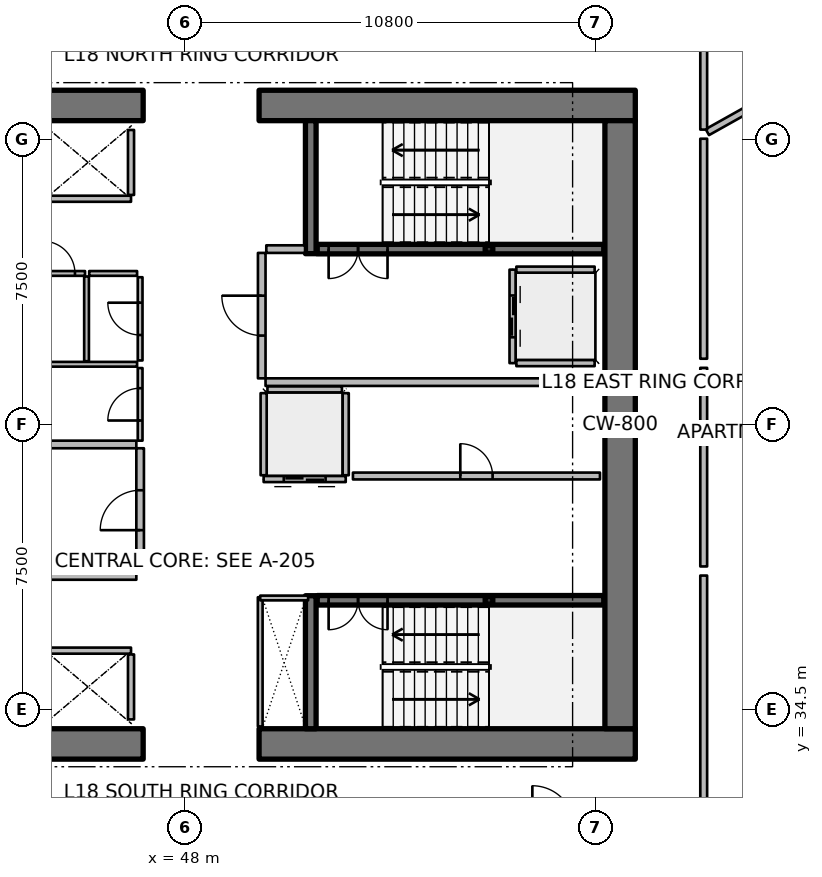
"""IFC4 building model, lengths in metres.
Left out: names, types, materials, properties, quantities, classifications, styles, units other than length and angle.
Written with IfcOpenShell. Run it as: python <this file> out.ifc"""

import sys

from ifc_helpers import new_model, si_unit, direction, frame, frame_2d, origin, origin_2d, place, context, subcontext, project, spatial, rectangle, hollow_rectangle, extrude, element, fill, save


model = new_model("IFC4")
c1 = context("Model", 3, precision=1e-05, world=origin(), true_north=direction((0.0, 1.0)))
c2 = subcontext(c1, "Body", "Model", "MODEL_VIEW")
j1 = project(units=[si_unit("LENGTHUNIT", "METRE"), si_unit("PLANEANGLEUNIT", "RADIAN")], contexts=[c1])
p1 = place(None, origin())
s1 = spatial("IfcSite", under=j1, at=p1, CompositionType="ELEMENT")
p2 = place(p1, origin())
s2 = spatial("IfcBuilding", under=s1, at=p2, CompositionType="ELEMENT")
p3 = place(p2, frame((0.0, 0.0, 75.15)))
s3 = spatial("IfcBuildingStorey", under=s2, at=p3, CompositionType="ELEMENT", Elevation=75.15)
p4 = place(p3, frame((37.0, 33.6, 0.0), z_axis=(0.0, 0.0, 1.0), x_axis=(1.0, 0.0, 0.0)))
e1 = element("IfcWall", 1, at=p4, inside=s3, PredefinedType="SHEAR", context=c2, shape_type="SweptSolid", body=[
    extrude(rectangle(XDim=9.9, YDim=0.8, at=frame_2d((4.95, 0.0))), origin(), (0.0, 0.0, 1.0), 3.75),
])
p5 = place(p3, frame((49.95, 33.6, 0.0), z_axis=(0.0, 0.0, 1.0), x_axis=(1.0, 0.0, 0.0)))
e2 = element("IfcWall", 2, at=p5, inside=s3, PredefinedType="SHEAR", context=c2, shape_type="SweptSolid", body=[
    extrude(rectangle(XDim=9.9, YDim=0.8, at=frame_2d((4.95, 0.0))), origin(), (0.0, 0.0, 1.0), 3.75),
])
p6 = place(p3, frame((37.0, 50.4, 0.0), z_axis=(0.0, 0.0, 1.0), x_axis=(1.0, 0.0, 0.0)))
e3 = element("IfcWall", 3, at=p6, inside=s3, PredefinedType="SHEAR", context=c2, shape_type="SweptSolid", body=[
    extrude(rectangle(XDim=9.9, YDim=0.8, at=frame_2d((4.95, 0.0))), origin(), (0.0, 0.0, 1.0), 3.75),
])
p7 = place(p3, frame((49.95, 50.4, 0.0), z_axis=(0.0, 0.0, 1.0), x_axis=(1.0, 0.0, 0.0)))
e4 = element("IfcWall", 4, at=p7, inside=s3, PredefinedType="SHEAR", context=c2, shape_type="SweptSolid", body=[
    extrude(rectangle(XDim=9.9, YDim=0.8, at=frame_2d((4.95, 0.0))), origin(), (0.0, 0.0, 1.0), 3.75),
])
p8 = place(p3, frame((59.45, 34.0, 0.0), z_axis=(0.0, 0.0, 1.0), x_axis=(0.0, 1.0, 0.0)))
e5 = element("IfcWall", 5, at=p8, inside=s3, PredefinedType="SHEAR", context=c2, shape_type="SweptSolid", body=[
    extrude(rectangle(XDim=16.0, YDim=0.8, at=frame_2d((8.0, 0.0))), origin(), (0.0, 0.0, 1.0), 3.75),
])
for number, where, z_axis, x_axis in (
    (6, (51.31, 46.5, 0.0), (0.0, 0.0, 1.0), (0.0, 1.0, 0.0)),
    (7, (51.31, 34.0, 0.0), (0.0, 0.0, 1.0), (0.0, 1.0, 0.0)),
):
    element("IfcWall", number, at=place(p3, frame(where, z_axis=z_axis, x_axis=x_axis)), inside=s3, PredefinedType="SHEAR", context=c2, shape_type="SweptSolid", body=[
        extrude(rectangle(XDim=3.5, YDim=0.28, at=frame_2d((1.75, 0.0))), origin(), (0.0, 0.0, 1.0), 3.75),
    ])
for number, where, z_axis, x_axis in (
    (8, (56.0, 46.62, 0.0), (0.0, 0.0, 1.0), (1.0, 0.0, 0.0)),
    (9, (56.0, 37.38, 0.0), (0.0, 0.0, 1.0), (1.0, 0.0, 0.0)),
):
    element("IfcColumn", number, at=place(p3, frame(where, z_axis=z_axis, x_axis=x_axis)), inside=s3, PredefinedType="COLUMN", context=c2, shape_type="SweptSolid", body=[
        extrude(hollow_rectangle(XDim=0.2, YDim=0.2, WallThickness=0.01, InnerFilletRadius=0.01, OuterFilletRadius=0.02, at=origin_2d()), origin(), (0.0, 0.0, 1.0), 1.67),
    ])
p9 = place(p3, frame((51.48, 46.62, 0.0), z_axis=(0.0, 0.0, 1.0), x_axis=(1.0, 0.0, 0.0)))
e10 = element("IfcWall", 10, at=p9, inside=s3, PredefinedType="SOLIDWALL", context=c2, shape_type="SweptSolid", body=[
    extrude(rectangle(XDim=7.54, YDim=0.25, at=frame_2d((3.77, 0.0))), origin(), (0.0, 0.0, 1.0), 3.5),
])
p10 = place(p9, frame((0.3, 0.0, 0.0)))
e11 = element("IfcOpeningElement", 11, at=p10, cuts=e10, PredefinedType="OPENING", context=c2, shape_type="SweptSolid", body=[
    extrude(rectangle(XDim=1.55, YDim=2.15, at=frame_2d((0.775, 1.075))), frame((0.0, 0.135, 0.0), z_axis=(0.0, -1.0, 0.0), x_axis=(1.0, 0.0, 0.0)), (0.0, 0.0, 1.0), 0.27),
])
p11 = place(p3, frame((51.48, 37.38, 0.0), z_axis=(0.0, 0.0, 1.0), x_axis=(1.0, 0.0, 0.0)))
e12 = element("IfcWall", 12, at=p11, inside=s3, PredefinedType="SOLIDWALL", context=c2, shape_type="SweptSolid", body=[
    extrude(rectangle(XDim=7.54, YDim=0.25, at=frame_2d((3.77, 0.0))), origin(), (0.0, 0.0, 1.0), 3.5),
])
p12 = place(p11, frame((0.3, 0.0, 0.0)))
e13 = element("IfcOpeningElement", 13, at=p12, cuts=e12, PredefinedType="OPENING", context=c2, shape_type="SweptSolid", body=[
    extrude(rectangle(XDim=1.55, YDim=2.15, at=frame_2d((0.775, 1.075))), frame((0.0, 0.135, 0.0), z_axis=(0.0, -1.0, 0.0), x_axis=(1.0, 0.0, 0.0)), (0.0, 0.0, 1.0), 0.27),
])
p13 = place(p3, frame((46.58, 47.945, 0.0), z_axis=(0.0, 0.0, 1.0), x_axis=(-1.0, 0.0, 0.0)))
e14 = element("IfcWall", 14, at=p13, inside=s3, PredefinedType="PARTITIONING", context=c2, shape_type="SweptSolid", body=[
    extrude(rectangle(XDim=2.26, YDim=0.16, at=frame_2d((1.13, 0.0))), origin(), (0.0, 0.0, 1.0), 3.5),
])
p14 = place(p3, frame((46.58, 48.045, 0.0), z_axis=(0.0, 0.0, 1.0), x_axis=(0.0, 1.0, 0.0)))
e15 = element("IfcWall", 15, at=p14, inside=s3, PredefinedType="PARTITIONING", context=c2, shape_type="SweptSolid", body=[
    extrude(rectangle(XDim=1.71, YDim=0.16, at=frame_2d((0.855, 0.0))), origin(), (0.0, 0.0, 1.0), 3.5),
])
p15 = place(p3, frame((44.32, 36.055, 0.0), z_axis=(0.0, 0.0, 1.0), x_axis=(1.0, 0.0, 0.0)))
e16 = element("IfcWall", 16, at=p15, inside=s3, PredefinedType="PARTITIONING", context=c2, shape_type="SweptSolid", body=[
    extrude(rectangle(XDim=2.26, YDim=0.16, at=frame_2d((1.13, 0.0))), origin(), (0.0, 0.0, 1.0), 3.5),
])
p16 = place(p3, frame((46.58, 34.245, 0.0), z_axis=(0.0, 0.0, 1.0), x_axis=(0.0, 1.0, 0.0)))
e17 = element("IfcWall", 17, at=p16, inside=s3, PredefinedType="PARTITIONING", context=c2, shape_type="SweptSolid", body=[
    extrude(rectangle(XDim=1.71, YDim=0.16, at=frame_2d((0.855, 0.0))), origin(), (0.0, 0.0, 1.0), 3.5),
])
p17 = place(p3, frame((56.62, 46.08, 0.0), z_axis=(0.0, 0.0, 1.0), x_axis=(0.0, -1.0, 0.0)))
e18 = element("IfcWall", 18, at=p17, inside=s3, PredefinedType="PARTITIONING", context=c2, shape_type="SweptSolid", body=[
    extrude(rectangle(XDim=2.46, YDim=0.16, at=frame_2d((1.23, 0.0))), origin(), (0.0, 0.0, 1.0), 3.5),
])
p18 = place(p17, frame((0.68, 0.0, 0.0)))
e19 = element("IfcOpeningElement", 19, at=p18, cuts=e18, PredefinedType="OPENING", context=c2, shape_type="SweptSolid", body=[
    extrude(rectangle(XDim=1.1, YDim=2.1, at=frame_2d((0.55, 1.05))), frame((0.0, 0.09, 0.0), z_axis=(0.0, -1.0, 0.0), x_axis=(1.0, 0.0, 0.0)), (0.0, 0.0, 1.0), 0.18),
])
for number, where, z_axis, x_axis in (
    (20, (56.72, 46.08, 0.0), (0.0, 0.0, 1.0), (1.0, 0.0, 0.0)),
    (21, (56.72, 43.62, 0.0), (0.0, 0.0, 1.0), (1.0, 0.0, 0.0)),
):
    element("IfcWall", number, at=place(p3, frame(where, z_axis=z_axis, x_axis=x_axis)), inside=s3, PredefinedType="PARTITIONING", context=c2, shape_type="SweptSolid", body=[
        extrude(rectangle(XDim=2.06, YDim=0.16, at=frame_2d((1.03, 0.0))), origin(), (0.0, 0.0, 1.0), 3.5),
    ])
p19 = place(p3, frame((52.23, 40.57, 0.0), z_axis=(0.0, 0.0, 1.0), x_axis=(-1.0, 0.0, 0.0)))
e22 = element("IfcWall", 22, at=p19, inside=s3, PredefinedType="PARTITIONING", context=c2, shape_type="SweptSolid", body=[
    extrude(rectangle(XDim=2.16, YDim=0.16, at=frame_2d((1.08, 0.0))), origin(), (0.0, 0.0, 1.0), 3.5),
])
p20 = place(p19, frame((0.53, 0.0, 0.0)))
e23 = element("IfcOpeningElement", 23, at=p20, cuts=e22, PredefinedType="OPENING", context=c2, shape_type="SweptSolid", body=[
    extrude(rectangle(XDim=1.1, YDim=2.1, at=frame_2d((0.55, 1.05))), frame((0.0, 0.09, 0.0), z_axis=(0.0, -1.0, 0.0), x_axis=(1.0, 0.0, 0.0)), (0.0, 0.0, 1.0), 0.18),
])
for number, where, z_axis, x_axis in (
    (24, (52.23, 40.67, 0.0), (0.0, 0.0, 1.0), (0.0, 1.0, 0.0)),
    (25, (50.07, 40.67, 0.0), (0.0, 0.0, 1.0), (0.0, 1.0, 0.0)),
):
    element("IfcWall", number, at=place(p3, frame(where, z_axis=z_axis, x_axis=x_axis)), inside=s3, PredefinedType="PARTITIONING", context=c2, shape_type="SweptSolid", body=[
        extrude(rectangle(XDim=2.16, YDim=0.16, at=frame_2d((1.08, 0.0))), origin(), (0.0, 0.0, 1.0), 3.5),
    ])
p21 = place(p3, frame((50.17, 42.93, 0.0), z_axis=(0.0, 0.0, 1.0), x_axis=(1.0, 0.0, 0.0)))
e26 = element("IfcWall", 26, at=p21, inside=s3, PredefinedType="PARTITIONING", context=c2, shape_type="SweptSolid", body=[
    extrude(rectangle(XDim=1.96, YDim=0.16, at=frame_2d((0.98, 0.0))), origin(), (0.0, 0.0, 1.0), 3.5),
])
p22 = place(p3, frame((52.42, 40.65, 0.0), z_axis=(0.0, 0.0, 1.0), x_axis=(1.0, 0.0, 0.0)))
e27 = element("IfcWall", 27, at=p22, inside=s3, PredefinedType="PARTITIONING", context=c2, shape_type="SweptSolid", body=[
    extrude(rectangle(XDim=6.5, YDim=0.18, at=frame_2d((3.25, 0.0))), origin(), (0.0, 0.0, 1.0), 3.5),
])
p23 = place(p22, frame((2.825, 0.0, 0.0)))
e28 = element("IfcOpeningElement", 28, at=p23, cuts=e27, PredefinedType="OPENING", context=c2, shape_type="SweptSolid", body=[
    extrude(rectangle(XDim=0.85, YDim=2.06, at=frame_2d((0.425, 1.03))), frame((0.0, 0.1, 0.0), z_axis=(0.0, -1.0, 0.0), x_axis=(1.0, 0.0, 0.0)), (0.0, 0.0, 1.0), 0.2),
])
p24 = place(p3, frame((41.35, 38.02, 0.0), z_axis=(0.0, 0.0, 1.0), x_axis=(1.0, 0.0, 0.0)))
e29 = element("IfcWall", 29, at=p24, inside=s3, PredefinedType="PARTITIONING", context=c2, shape_type="SweptSolid", body=[
    extrude(rectangle(XDim=5.37, YDim=0.2, at=frame_2d((2.685, 0.0))), origin(), (0.0, 0.0, 1.0), 3.5),
])
p25 = place(p3, frame((43.92, 41.48, 0.0), z_axis=(0.0, 0.0, 1.0), x_axis=(1.0, 0.0, 0.0)))
e30 = element("IfcWall", 30, at=p25, inside=s3, PredefinedType="PARTITIONING", context=c2, shape_type="SweptSolid", body=[
    extrude(rectangle(XDim=2.8, YDim=0.2, at=frame_2d((1.4, 0.0))), origin(), (0.0, 0.0, 1.0), 3.5),
])
p26 = place(p3, frame((46.82, 38.12, 0.0), z_axis=(0.0, 0.0, 1.0), x_axis=(0.0, 1.0, 0.0)))
e31 = element("IfcWall", 31, at=p26, inside=s3, PredefinedType="PARTITIONING", context=c2, shape_type="SweptSolid", body=[
    extrude(rectangle(XDim=3.26, YDim=0.2, at=frame_2d((1.63, 0.0))), origin(), (0.0, 0.0, 1.0), 3.5),
])
p27 = place(p26, frame((1.105, 0.0, 0.0)))
e32 = element("IfcOpeningElement", 32, at=p27, cuts=e31, PredefinedType="OPENING", context=c2, shape_type="SweptSolid", body=[
    extrude(rectangle(XDim=1.05, YDim=2.1, at=frame_2d((0.525, 1.05))), frame((0.0, 0.11, 0.0), z_axis=(0.0, -1.0, 0.0), x_axis=(1.0, 0.0, 0.0)), (0.0, 0.0, 1.0), 0.22),
])
p28 = place(p3, frame((50.12, 43.12, 0.0), z_axis=(0.0, 0.0, 1.0), x_axis=(1.0, 0.0, 0.0)))
e33 = element("IfcWall", 33, at=p28, inside=s3, PredefinedType="PARTITIONING", context=c2, shape_type="SweptSolid", body=[
    extrude(rectangle(XDim=8.88, YDim=0.2, at=frame_2d((4.44, 0.0))), origin(), (0.0, 0.0, 1.0), 3.5),
])
p29 = place(p3, frame((50.14, 46.62, 0.0), z_axis=(0.0, 0.0, 1.0), x_axis=(1.0, 0.0, 0.0)))
e34 = element("IfcWall", 34, at=p29, inside=s3, PredefinedType="PARTITIONING", context=c2, shape_type="SweptSolid", body=[
    extrude(rectangle(XDim=1.02, YDim=0.2, at=frame_2d((0.51, 0.0))), origin(), (0.0, 0.0, 1.0), 3.5),
])
p30 = place(p3, frame((50.02, 43.22, 0.0), z_axis=(0.0, 0.0, 1.0), x_axis=(0.0, 1.0, 0.0)))
e35 = element("IfcWall", 35, at=p30, inside=s3, PredefinedType="PARTITIONING", context=c2, shape_type="SweptSolid", body=[
    extrude(rectangle(XDim=3.3, YDim=0.2, at=frame_2d((1.65, 0.0))), origin(), (0.0, 0.0, 1.0), 3.5),
])
p31 = place(p30, frame((1.125, 0.0, 0.0)))
e36 = element("IfcOpeningElement", 36, at=p31, cuts=e35, PredefinedType="OPENING", context=c2, shape_type="SweptSolid", body=[
    extrude(rectangle(XDim=1.05, YDim=2.1, at=frame_2d((0.525, 1.05))), frame((0.0, 0.11, 0.0), z_axis=(0.0, -1.0, 0.0), x_axis=(1.0, 0.0, 0.0)), (0.0, 0.0, 1.0), 0.22),
])
p32 = place(p3, frame((49.98, 34.06, 0.0), z_axis=(0.0, 0.0, 1.0), x_axis=(0.0, 1.0, 0.0)))
e37 = element("IfcWall", 37, at=p32, inside=s3, PredefinedType="PARTITIONING", context=c2, shape_type="SweptSolid", body=[
    extrude(rectangle(XDim=3.4, YDim=0.125, at=frame_2d((1.7, 0.0))), origin(), (0.0, 0.0, 1.0), 2.94),
])
p33 = place(p3, frame((49.98, 37.44, 0.0), z_axis=(0.0, 0.0, 1.0), x_axis=(1.0, 0.0, 0.0)))
e38 = element("IfcWall", 38, at=p33, inside=s3, PredefinedType="PARTITIONING", context=c2, shape_type="SweptSolid", body=[
    extrude(rectangle(XDim=1.26, YDim=0.125, at=frame_2d((0.63, 0.0))), origin(), (0.0, 0.0, 1.0), 2.94),
])
p34 = place(p3, frame((44.03, 43.59, 0.0), z_axis=(0.0, 0.0, 1.0), x_axis=(1.0, 0.0, 0.0)))
e39 = element("IfcWall", 39, at=p34, inside=s3, PredefinedType="PARTITIONING", context=c2, shape_type="SweptSolid", body=[
    extrude(rectangle(XDim=2.71, YDim=0.125, at=frame_2d((1.355, 0.0))), origin(), (0.0, 0.0, 1.0), 2.94),
])
p35 = place(p3, frame((45.41, 43.67, 0.0), z_axis=(0.0, 0.0, 1.0), x_axis=(0.0, 1.0, 0.0)))
e40 = element("IfcWall", 40, at=p35, inside=s3, PredefinedType="PARTITIONING", context=c2, shape_type="SweptSolid", body=[
    extrude(rectangle(XDim=2.23, YDim=0.125, at=frame_2d((1.115, 0.0))), origin(), (0.0, 0.0, 1.0), 2.94),
])
p36 = place(p3, frame((46.82, 41.58, 0.0), z_axis=(0.0, 0.0, 1.0), x_axis=(0.0, 1.0, 0.0)))
e41 = element("IfcWall", 41, at=p36, inside=s3, PredefinedType="PARTITIONING", context=c2, shape_type="SweptSolid", body=[
    extrude(rectangle(XDim=1.91, YDim=0.125, at=frame_2d((0.955, 0.0))), origin(), (0.0, 0.0, 1.0), 2.94),
])
p37 = place(p36, frame((0.53, 0.0, 0.0)))
e42 = element("IfcOpeningElement", 42, at=p37, cuts=e41, PredefinedType="OPENING", context=c2, shape_type="SweptSolid", body=[
    extrude(rectangle(XDim=0.85, YDim=2.06, at=frame_2d((0.425, 1.03))), frame((0.0, 0.073, 0.0), z_axis=(0.0, -1.0, 0.0), x_axis=(1.0, 0.0, 0.0)), (0.0, 0.0, 1.0), 0.145),
])
p38 = place(p3, frame((46.82, 43.69, 0.0), z_axis=(0.0, 0.0, 1.0), x_axis=(0.0, 1.0, 0.0)))
e43 = element("IfcWall", 43, at=p38, inside=s3, PredefinedType="PARTITIONING", context=c2, shape_type="SweptSolid", body=[
    extrude(rectangle(XDim=2.19, YDim=0.125, at=frame_2d((1.095, 0.0))), origin(), (0.0, 0.0, 1.0), 2.94),
])
p39 = place(p38, frame((0.67, 0.0, 0.0)))
e44 = element("IfcOpeningElement", 44, at=p39, cuts=e43, PredefinedType="OPENING", context=c2, shape_type="SweptSolid", body=[
    extrude(rectangle(XDim=0.85, YDim=2.06, at=frame_2d((0.425, 1.03))), frame((0.0, 0.073, 0.0), z_axis=(0.0, -1.0, 0.0), x_axis=(1.0, 0.0, 0.0)), (0.0, 0.0, 1.0), 0.145),
])
p40 = place(p3, frame((43.99, 45.98, 0.0), z_axis=(0.0, 0.0, 1.0), x_axis=(1.0, 0.0, 0.0)))
e45 = element("IfcWall", 45, at=p40, inside=s3, PredefinedType="PARTITIONING", context=c2, shape_type="SweptSolid", body=[
    extrude(rectangle(XDim=1.38, YDim=0.125, at=frame_2d((0.69, 0.0))), origin(), (0.0, 0.0, 1.0), 2.94),
])
p41 = place(p40, frame((0.265, 0.0, 0.0)))
e46 = element("IfcOpeningElement", 46, at=p41, cuts=e45, PredefinedType="OPENING", context=c2, shape_type="SweptSolid", body=[
    extrude(rectangle(XDim=0.85, YDim=2.06, at=frame_2d((0.425, 1.03))), frame((0.0, 0.073, 0.0), z_axis=(0.0, -1.0, 0.0), x_axis=(1.0, 0.0, 0.0)), (0.0, 0.0, 1.0), 0.145),
])
p42 = place(p3, frame((45.48, 45.98, 0.0), z_axis=(0.0, 0.0, 1.0), x_axis=(1.0, 0.0, 0.0)))
e47 = element("IfcWall", 47, at=p42, inside=s3, PredefinedType="PARTITIONING", context=c2, shape_type="SweptSolid", body=[
    extrude(rectangle(XDim=1.26, YDim=0.125, at=frame_2d((0.63, 0.0))), origin(), (0.0, 0.0, 1.0), 2.94),
])
p43 = place(p3, frame((61.746, 49.698, 0.0), z_axis=(0.0, 0.0, 1.0), x_axis=(0.872489938668, 0.488632077256, 0.0)))
e48 = element("IfcWall", 48, at=p43, inside=s3, PredefinedType="PARTITIONING", context=c2, shape_type="SweptSolid", body=[
    extrude(rectangle(XDim=13.725, YDim=0.18, at=frame_2d((6.862, 0.0))), origin(), (0.0, 0.0, 1.0), 2.94),
])
p44 = place(p3, frame((61.65, 49.764, 0.0), z_axis=(0.0, 0.0, 1.0), x_axis=(0.0, 1.0, 0.0)))
e49 = element("IfcWall", 49, at=p44, inside=s3, PredefinedType="PARTITIONING", context=c2, shape_type="SweptSolid", body=[
    extrude(rectangle(XDim=2.716, YDim=0.18, at=frame_2d((1.358, 0.0))), origin(), (0.0, 0.0, 1.0), 2.94),
])
p45 = place(p3, frame((61.65, 31.52, 0.0), z_axis=(0.0, 0.0, 1.0), x_axis=(0.0, 1.0, 0.0)))
e50 = element("IfcWall", 50, at=p45, inside=s3, PredefinedType="PARTITIONING", context=c2, shape_type="SweptSolid", body=[
    extrude(rectangle(XDim=6.51, YDim=0.18, at=frame_2d((3.255, 0.0))), origin(), (0.0, 0.0, 1.0), 2.94),
])
p46 = place(p3, frame((61.65, 38.27, 0.0), z_axis=(0.0, 0.0, 1.0), x_axis=(0.0, 1.0, 0.0)))
e51 = element("IfcWall", 51, at=p46, inside=s3, PredefinedType="PARTITIONING", context=c2, shape_type="SweptSolid", body=[
    extrude(rectangle(XDim=5.225, YDim=0.18, at=frame_2d((2.613, 0.0))), origin(), (0.0, 0.0, 1.0), 2.94),
])
p47 = place(p3, frame((61.65, 43.736, 0.0), z_axis=(0.0, 0.0, 1.0), x_axis=(0.0, 1.0, 0.0)))
e52 = element("IfcWall", 52, at=p47, inside=s3, PredefinedType="PARTITIONING", context=c2, shape_type="SweptSolid", body=[
    extrude(rectangle(XDim=5.789, YDim=0.18, at=frame_2d((2.895, 0.0))), origin(), (0.0, 0.0, 1.0), 2.94),
])
p48 = place(p10, origin())
e53 = element("IfcDoor", 53, at=p48, inside=s3, OperationType="DOUBLE_DOOR_SINGLE_SWING", PredefinedType="DOOR", context=c2, shape_type="SweptSolid", body=[
    extrude(rectangle(XDim=1.55, YDim=2.15, at=frame_2d((0.775, 1.075))), frame((0.0, 0.025, 0.0), z_axis=(0.0, -1.0, 0.0), x_axis=(1.0, 0.0, 0.0)), (0.0, 0.0, 1.0), 0.05),
])
fill(e11, e53)
p49 = place(p12, origin())
e54 = element("IfcDoor", 54, at=p49, inside=s3, OperationType="DOUBLE_DOOR_SINGLE_SWING", PredefinedType="DOOR", context=c2, shape_type="SweptSolid", body=[
    extrude(rectangle(XDim=1.55, YDim=2.15, at=frame_2d((0.775, 1.075))), frame((0.0, 0.025, 0.0), z_axis=(0.0, -1.0, 0.0), x_axis=(1.0, 0.0, 0.0)), (0.0, 0.0, 1.0), 0.05),
])
fill(e13, e54)
p50 = place(p18, origin())
e55 = element("IfcDoor", 55, at=p50, inside=s3, OperationType="DOUBLE_DOOR_SLIDING", PredefinedType="DOOR", context=c2, shape_type="SweptSolid", body=[
    extrude(rectangle(XDim=1.1, YDim=2.1, at=frame_2d((0.55, 1.05))), frame((0.0, 0.025, 0.0), z_axis=(0.0, -1.0, 0.0), x_axis=(1.0, 0.0, 0.0)), (0.0, 0.0, 1.0), 0.05),
])
fill(e19, e55)
p51 = place(p20, origin())
e56 = element("IfcDoor", 56, at=p51, inside=s3, OperationType="DOUBLE_DOOR_SLIDING", PredefinedType="DOOR", context=c2, shape_type="SweptSolid", body=[
    extrude(rectangle(XDim=1.1, YDim=2.1, at=frame_2d((0.55, 1.05))), frame((0.0, 0.025, 0.0), z_axis=(0.0, -1.0, 0.0), x_axis=(1.0, 0.0, 0.0)), (0.0, 0.0, 1.0), 0.05),
])
fill(e23, e56)
p52 = place(p23, origin())
e57 = element("IfcDoor", 57, at=p52, inside=s3, OperationType="SINGLE_SWING_LEFT", PredefinedType="DOOR", context=c2, shape_type="SweptSolid", body=[
    extrude(rectangle(XDim=0.85, YDim=2.06, at=frame_2d((0.425, 1.03))), frame((0.0, 0.025, 0.0), z_axis=(0.0, -1.0, 0.0), x_axis=(1.0, 0.0, 0.0)), (0.0, 0.0, 1.0), 0.05),
])
fill(e28, e57)
p53 = place(p27, origin())
e58 = element("IfcDoor", 58, at=p53, inside=s3, OperationType="SINGLE_SWING_LEFT", PredefinedType="DOOR", context=c2, shape_type="SweptSolid", body=[
    extrude(rectangle(XDim=1.05, YDim=2.1, at=frame_2d((0.525, 1.05))), frame((0.0, 0.025, 0.0), z_axis=(0.0, -1.0, 0.0), x_axis=(1.0, 0.0, 0.0)), (0.0, 0.0, 1.0), 0.05),
])
fill(e32, e58)
p54 = place(p31, origin())
e59 = element("IfcDoor", 59, at=p54, inside=s3, OperationType="SINGLE_SWING_RIGHT", PredefinedType="DOOR", context=c2, shape_type="SweptSolid", body=[
    extrude(rectangle(XDim=1.05, YDim=2.1, at=frame_2d((0.525, 1.05))), frame((0.0, 0.025, 0.0), z_axis=(0.0, -1.0, 0.0), x_axis=(1.0, 0.0, 0.0)), (0.0, 0.0, 1.0), 0.05),
])
fill(e36, e59)
p55 = place(p37, origin())
e60 = element("IfcDoor", 60, at=p55, inside=s3, OperationType="SINGLE_SWING_LEFT", PredefinedType="DOOR", context=c2, shape_type="SweptSolid", body=[
    extrude(rectangle(XDim=0.85, YDim=2.06, at=frame_2d((0.425, 1.03))), frame((0.0, 0.025, 0.0), z_axis=(0.0, -1.0, 0.0), x_axis=(1.0, 0.0, 0.0)), (0.0, 0.0, 1.0), 0.05),
])
fill(e42, e60)
p56 = place(p39, origin())
e61 = element("IfcDoor", 61, at=p56, inside=s3, OperationType="SINGLE_SWING_RIGHT", PredefinedType="DOOR", context=c2, shape_type="SweptSolid", body=[
    extrude(rectangle(XDim=0.85, YDim=2.06, at=frame_2d((0.425, 1.03))), frame((0.0, 0.025, 0.0), z_axis=(0.0, -1.0, 0.0), x_axis=(1.0, 0.0, 0.0)), (0.0, 0.0, 1.0), 0.05),
])
fill(e44, e61)
p57 = place(p41, origin())
e62 = element("IfcDoor", 62, at=p57, inside=s3, OperationType="SINGLE_SWING_LEFT", PredefinedType="DOOR", context=c2, shape_type="SweptSolid", body=[
    extrude(rectangle(XDim=0.85, YDim=2.06, at=frame_2d((0.425, 1.03))), frame((0.0, 0.025, 0.0), z_axis=(0.0, -1.0, 0.0), x_axis=(1.0, 0.0, 0.0)), (0.0, 0.0, 1.0), 0.05),
])
fill(e46, e62)
save(model, sys.argv[1])
